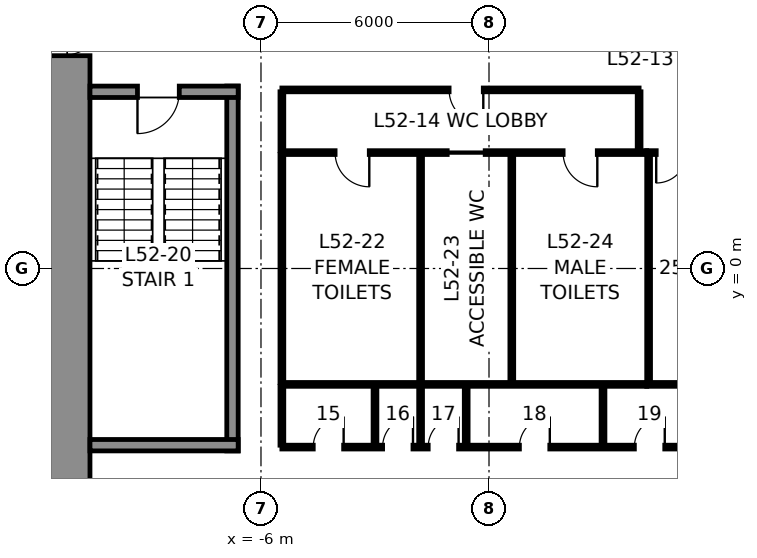
"""IFC4 building model, lengths in metres.
Left out: names, types, materials, properties, quantities, classifications, styles, units other than length and angle.
Written with IfcOpenShell. Run it as: python <this file> out.ifc"""

import sys

from ifc_helpers import new_model, si_unit, direction, frame, frame_2d, origin, place, context, subcontext, project, spatial, rectangle, extrude, element, fill, save


model = new_model("IFC4")
c1 = context("Model", 3, precision=1e-05, world=origin(), true_north=direction((0.0, 1.0)))
c2 = subcontext(c1, "Body", "Model", "MODEL_VIEW")
j1 = project(units=[si_unit("LENGTHUNIT", "METRE"), si_unit("PLANEANGLEUNIT", "RADIAN")], contexts=[c1])
p1 = place(None, origin())
s1 = spatial("IfcSite", under=j1, at=p1, CompositionType="ELEMENT")
p2 = place(p1, origin())
s2 = spatial("IfcBuilding", under=s1, at=p2, CompositionType="ELEMENT")
p3 = place(p2, frame((0.0, 0.0, 237.8)))
s3 = spatial("IfcBuildingStorey", under=s2, at=p3, CompositionType="ELEMENT", Elevation=237.8)
p4 = place(p3, frame((-11.25, -10.5, 0.0), z_axis=(0.0, 0.0, 1.0), x_axis=(0.0, 1.0, 0.0)))
e1 = element("IfcWall", 1, at=p4, inside=s3, PredefinedType="SHEAR", context=c2, shape_type="SweptSolid", body=[
    extrude(rectangle(XDim=21.0, YDim=1.5, at=frame_2d((10.5, 0.0))), origin(), (0.0, 0.0, 1.0), 4.0),
])
p5 = place(p4, frame((16.1, 0.0, 0.0)))
e2 = element("IfcOpeningElement", 2, at=p5, cuts=e1, PredefinedType="OPENING", context=c2, shape_type="SweptSolid", body=[
    extrude(rectangle(XDim=1.2, YDim=2.3, at=frame_2d((0.6, 1.15))), frame((0.0, 0.76, 0.0), z_axis=(0.0, -1.0, 0.0), x_axis=(1.0, 0.0, 0.0)), (0.0, 0.0, 1.0), 1.52),
])
p6 = place(p4, frame((3.7, 0.0, 0.0)))
e3 = element("IfcOpeningElement", 3, at=p6, cuts=e1, PredefinedType="OPENING", context=c2, shape_type="SweptSolid", body=[
    extrude(rectangle(XDim=1.2, YDim=2.3, at=frame_2d((0.6, 1.15))), frame((0.0, 0.76, 0.0), z_axis=(0.0, -1.0, 0.0), x_axis=(1.0, 0.0, 0.0)), (0.0, 0.0, 1.0), 1.52),
])
p7 = place(p3, frame((-6.75, -4.8, 0.0), z_axis=(0.0, 0.0, 1.0), x_axis=(0.0, 1.0, 0.0)))
e4 = element("IfcWall", 4, at=p7, inside=s3, PredefinedType="SOLIDWALL", context=c2, shape_type="SweptSolid", body=[
    extrude(rectangle(XDim=9.6, YDim=0.3, at=frame_2d((4.8, 0.0))), origin(), (0.0, 0.0, 1.0), 3.75),
])
p8 = place(p3, frame((-10.5, 4.65, 0.0), z_axis=(0.0, 0.0, 1.0), x_axis=(1.0, 0.0, 0.0)))
e5 = element("IfcWall", 5, at=p8, inside=s3, PredefinedType="SOLIDWALL", context=c2, shape_type="SweptSolid", body=[
    extrude(rectangle(XDim=3.9, YDim=0.3, at=frame_2d((1.95, 0.0))), origin(), (0.0, 0.0, 1.0), 3.75),
])
p9 = place(p8, frame((1.25, 0.0, 0.0)))
e6 = element("IfcOpeningElement", 6, at=p9, cuts=e5, PredefinedType="OPENING", context=c2, shape_type="SweptSolid", body=[
    extrude(rectangle(XDim=1.1, YDim=2.3, at=frame_2d((0.55, 1.15))), frame((0.0, 0.16, 0.0), z_axis=(0.0, -1.0, 0.0), x_axis=(1.0, 0.0, 0.0)), (0.0, 0.0, 1.0), 0.32),
])
p10 = place(p3, frame((-6.6, -4.65, 0.0), z_axis=(0.0, 0.0, 1.0), x_axis=(-1.0, 0.0, 0.0)))
e7 = element("IfcWall", 7, at=p10, inside=s3, PredefinedType="SOLIDWALL", context=c2, shape_type="SweptSolid", body=[
    extrude(rectangle(XDim=3.9, YDim=0.3, at=frame_2d((1.95, 0.0))), origin(), (0.0, 0.0, 1.0), 3.75),
])
p11 = place(p3, frame((-5.45, 3.05, 0.0), z_axis=(0.0, 0.0, 1.0), x_axis=(1.0, 0.0, 0.0)))
e8 = element("IfcWall", 8, at=p11, inside=s3, PredefinedType="PARTITIONING", context=c2, shape_type="SweptSolid", body=[
    extrude(rectangle(XDim=9.6, YDim=0.1, at=frame_2d((4.8, 0.0))), origin(), (0.0, 0.0, 1.0), 3.75),
])
p12 = place(p11, frame((1.4, 0.0, 0.0)))
e9 = element("IfcOpeningElement", 9, at=p12, cuts=e8, PredefinedType="OPENING", context=c2, shape_type="SweptSolid", body=[
    extrude(rectangle(XDim=0.9, YDim=2.3, at=frame_2d((0.45, 1.15))), frame((0.0, 0.06, 0.0), z_axis=(0.0, -1.0, 0.0), x_axis=(1.0, 0.0, 0.0)), (0.0, 0.0, 1.0), 0.12),
])
p13 = place(p11, frame((4.35, 0.0, 0.0)))
e10 = element("IfcOpeningElement", 10, at=p13, cuts=e8, PredefinedType="OPENING", context=c2, shape_type="SweptSolid", body=[
    extrude(rectangle(XDim=1.0, YDim=2.3, at=frame_2d((0.5, 1.15))), frame((0.0, 0.06, 0.0), z_axis=(0.0, -1.0, 0.0), x_axis=(1.0, 0.0, 0.0)), (0.0, 0.0, 1.0), 0.12),
])
p14 = place(p11, frame((7.4, 0.0, 0.0)))
e11 = element("IfcOpeningElement", 11, at=p14, cuts=e8, PredefinedType="OPENING", context=c2, shape_type="SweptSolid", body=[
    extrude(rectangle(XDim=0.9, YDim=2.3, at=frame_2d((0.45, 1.15))), frame((0.0, 0.06, 0.0), z_axis=(0.0, -1.0, 0.0), x_axis=(1.0, 0.0, 0.0)), (0.0, 0.0, 1.0), 0.12),
])
p15 = place(p3, frame((4.15, 3.05, 0.0), z_axis=(0.0, 0.0, 1.0), x_axis=(1.0, 0.0, 0.0)))
e12 = element("IfcWall", 12, at=p15, inside=s3, PredefinedType="PARTITIONING", context=c2, shape_type="SweptSolid", body=[
    extrude(rectangle(XDim=1.3, YDim=0.1, at=frame_2d((0.65, 0.0))), origin(), (0.0, 0.0, 1.0), 3.75),
])
p16 = place(p15, frame((0.25, 0.0, 0.0)))
e13 = element("IfcOpeningElement", 13, at=p16, cuts=e12, PredefinedType="OPENING", context=c2, shape_type="SweptSolid", body=[
    extrude(rectangle(XDim=0.8, YDim=2.3, at=frame_2d((0.4, 1.15))), frame((0.0, 0.06, 0.0), z_axis=(0.0, -1.0, 0.0), x_axis=(1.0, 0.0, 0.0)), (0.0, 0.0, 1.0), 0.12),
])
p17 = place(p3, frame((4.15, -3.05, 0.0), z_axis=(0.0, 0.0, 1.0), x_axis=(-1.0, 0.0, 0.0)))
e14 = element("IfcWall", 14, at=p17, inside=s3, PredefinedType="PARTITIONING", context=c2, shape_type="SweptSolid", body=[
    extrude(rectangle(XDim=9.6, YDim=0.1, at=frame_2d((4.8, 0.0))), origin(), (0.0, 0.0, 1.0), 3.75),
])
p18 = place(p3, frame((5.45, -3.05, 0.0), z_axis=(0.0, 0.0, 1.0), x_axis=(-1.0, 0.0, 0.0)))
e15 = element("IfcWall", 15, at=p18, inside=s3, PredefinedType="PARTITIONING", context=c2, shape_type="SweptSolid", body=[
    extrude(rectangle(XDim=1.3, YDim=0.1, at=frame_2d((0.65, 0.0))), origin(), (0.0, 0.0, 1.0), 3.75),
])
for number, where, z_axis, x_axis in (
    (16, (-5.45, -3.0, 0.0), (0.0, 0.0, 1.0), (0.0, 1.0, 0.0)),
    (17, (-1.8, -3.0, 0.0), (0.0, 0.0, 1.0), (0.0, 1.0, 0.0)),
    (18, (0.6, -3.0, 0.0), (0.0, 0.0, 1.0), (0.0, 1.0, 0.0)),
    (19, (4.2, -3.0, 0.0), (0.0, 0.0, 1.0), (0.0, 1.0, 0.0)),
):
    element("IfcWall", number, at=place(p3, frame(where, z_axis=z_axis, x_axis=x_axis)), inside=s3, PredefinedType="PARTITIONING", context=c2, shape_type="SweptSolid", body=[
        extrude(rectangle(XDim=6.0, YDim=0.1, at=frame_2d((3.0, 0.0))), origin(), (0.0, 0.0, 1.0), 3.75),
    ])
p19 = place(p3, frame((-5.45, 4.7, 0.0), z_axis=(0.0, 0.0, 1.0), x_axis=(1.0, 0.0, 0.0)))
e20 = element("IfcWall", 20, at=p19, inside=s3, PredefinedType="PARTITIONING", context=c2, shape_type="SweptSolid", body=[
    extrude(rectangle(XDim=9.4, YDim=0.1, at=frame_2d((4.7, 0.0))), origin(), (0.0, 0.0, 1.0), 3.75),
])
p20 = place(p19, frame((4.4, 0.0, 0.0)))
e21 = element("IfcOpeningElement", 21, at=p20, cuts=e20, PredefinedType="OPENING", context=c2, shape_type="SweptSolid", body=[
    extrude(rectangle(XDim=0.9, YDim=2.3, at=frame_2d((0.45, 1.15))), frame((0.0, 0.06, 0.0), z_axis=(0.0, -1.0, 0.0), x_axis=(1.0, 0.0, 0.0)), (0.0, 0.0, 1.0), 0.12),
])
for number, where, z_axis, x_axis in (
    (22, (-5.45, 3.1, 0.0), (0.0, 0.0, 1.0), (0.0, 1.0, 0.0)),
    (23, (3.95, 3.1, 0.0), (0.0, 0.0, 1.0), (0.0, 1.0, 0.0)),
):
    element("IfcWall", number, at=place(p3, frame(where, z_axis=z_axis, x_axis=x_axis)), inside=s3, PredefinedType="PARTITIONING", context=c2, shape_type="SweptSolid", body=[
        extrude(rectangle(XDim=1.55, YDim=0.1, at=frame_2d((0.775, 0.0))), origin(), (0.0, 0.0, 1.0), 3.75),
    ])
p21 = place(p3, frame((5.45, -4.7, 0.0), z_axis=(0.0, 0.0, 1.0), x_axis=(-1.0, 0.0, 0.0)))
e24 = element("IfcWall", 24, at=p21, inside=s3, PredefinedType="PARTITIONING", context=c2, shape_type="SweptSolid", body=[
    extrude(rectangle(XDim=10.9, YDim=0.1, at=frame_2d((5.45, 0.0))), origin(), (0.0, 0.0, 1.0), 3.75),
])
p22 = place(p21, frame((9.275, 0.0, 0.0)))
e25 = element("IfcOpeningElement", 25, at=p22, cuts=e24, PredefinedType="OPENING", context=c2, shape_type="SweptSolid", body=[
    extrude(rectangle(XDim=0.8, YDim=2.3, at=frame_2d((0.4, 1.15))), frame((0.0, 0.06, 0.0), z_axis=(0.0, -1.0, 0.0), x_axis=(1.0, 0.0, 0.0)), (0.0, 0.0, 1.0), 0.12),
])
p23 = place(p21, frame((7.45, 0.0, 0.0)))
e26 = element("IfcOpeningElement", 26, at=p23, cuts=e24, PredefinedType="OPENING", context=c2, shape_type="SweptSolid", body=[
    extrude(rectangle(XDim=0.8, YDim=2.3, at=frame_2d((0.4, 1.15))), frame((0.0, 0.06, 0.0), z_axis=(0.0, -1.0, 0.0), x_axis=(1.0, 0.0, 0.0)), (0.0, 0.0, 1.0), 0.12),
])
p24 = place(p21, frame((6.25, 0.0, 0.0)))
e27 = element("IfcOpeningElement", 27, at=p24, cuts=e24, PredefinedType="OPENING", context=c2, shape_type="SweptSolid", body=[
    extrude(rectangle(XDim=0.8, YDim=2.3, at=frame_2d((0.4, 1.15))), frame((0.0, 0.06, 0.0), z_axis=(0.0, -1.0, 0.0), x_axis=(1.0, 0.0, 0.0)), (0.0, 0.0, 1.0), 0.12),
])
p25 = place(p21, frame((3.85, 0.0, 0.0)))
e28 = element("IfcOpeningElement", 28, at=p25, cuts=e24, PredefinedType="OPENING", context=c2, shape_type="SweptSolid", body=[
    extrude(rectangle(XDim=0.8, YDim=2.3, at=frame_2d((0.4, 1.15))), frame((0.0, 0.06, 0.0), z_axis=(0.0, -1.0, 0.0), x_axis=(1.0, 0.0, 0.0)), (0.0, 0.0, 1.0), 0.12),
])
p26 = place(p21, frame((0.825, 0.0, 0.0)))
e29 = element("IfcOpeningElement", 29, at=p26, cuts=e24, PredefinedType="OPENING", context=c2, shape_type="SweptSolid", body=[
    extrude(rectangle(XDim=0.8, YDim=2.3, at=frame_2d((0.4, 1.15))), frame((0.0, 0.06, 0.0), z_axis=(0.0, -1.0, 0.0), x_axis=(1.0, 0.0, 0.0)), (0.0, 0.0, 1.0), 0.12),
])
for number, where, z_axis, x_axis in (
    (30, (-5.45, -3.1, 0.0), (0.0, 0.0, 1.0), (0.0, -1.0, 0.0)),
    (31, (-3.0, -3.1, 0.0), (0.0, 0.0, 1.0), (0.0, -1.0, 0.0)),
    (32, (-1.8, -3.1, 0.0), (0.0, 0.0, 1.0), (0.0, -1.0, 0.0)),
    (33, (-0.6, -3.1, 0.0), (0.0, 0.0, 1.0), (0.0, -1.0, 0.0)),
    (34, (3.0, -3.1, 0.0), (0.0, 0.0, 1.0), (0.0, -1.0, 0.0)),
):
    element("IfcWall", number, at=place(p3, frame(where, z_axis=z_axis, x_axis=x_axis)), inside=s3, PredefinedType="PARTITIONING", context=c2, shape_type="SweptSolid", body=[
        extrude(rectangle(XDim=1.55, YDim=0.1, at=frame_2d((0.775, 0.0))), origin(), (0.0, 0.0, 1.0), 3.75),
    ])
p27 = place(p9, frame((1.1, 0.0, 0.0), z_axis=(0.0, 0.0, 1.0), x_axis=(-1.0, 0.0, 0.0)))
e35 = element("IfcDoor", 35, at=p27, inside=s3, OperationType="SINGLE_SWING_RIGHT", PredefinedType="DOOR", context=c2, shape_type="SweptSolid", body=[
    extrude(rectangle(XDim=1.1, YDim=2.3, at=frame_2d((0.55, 1.15))), frame((0.0, 0.025, 0.0), z_axis=(0.0, -1.0, 0.0), x_axis=(1.0, 0.0, 0.0)), (0.0, 0.0, 1.0), 0.05),
])
fill(e6, e35)
p28 = place(p12, frame((0.9, 0.0, 0.0), z_axis=(0.0, 0.0, 1.0), x_axis=(-1.0, 0.0, 0.0)))
e36 = element("IfcDoor", 36, at=p28, inside=s3, OperationType="SINGLE_SWING_LEFT", PredefinedType="DOOR", context=c2, shape_type="SweptSolid", body=[
    extrude(rectangle(XDim=0.9, YDim=2.3, at=frame_2d((0.45, 1.15))), frame((0.0, 0.025, 0.0), z_axis=(0.0, -1.0, 0.0), x_axis=(1.0, 0.0, 0.0)), (0.0, 0.0, 1.0), 0.05),
])
fill(e9, e36)
p29 = place(p13, frame((1.0, 0.0, 0.0), z_axis=(0.0, 0.0, 1.0), x_axis=(-1.0, 0.0, 0.0)))
e37 = element("IfcDoor", 37, at=p29, inside=s3, OperationType="SLIDING_TO_LEFT", PredefinedType="DOOR", context=c2, shape_type="SweptSolid", body=[
    extrude(rectangle(XDim=1.0, YDim=2.3, at=frame_2d((0.5, 1.15))), frame((0.0, 0.025, 0.0), z_axis=(0.0, -1.0, 0.0), x_axis=(1.0, 0.0, 0.0)), (0.0, 0.0, 1.0), 0.05),
])
fill(e10, e37)
p30 = place(p14, frame((0.9, 0.0, 0.0), z_axis=(0.0, 0.0, 1.0), x_axis=(-1.0, 0.0, 0.0)))
e38 = element("IfcDoor", 38, at=p30, inside=s3, OperationType="SINGLE_SWING_LEFT", PredefinedType="DOOR", context=c2, shape_type="SweptSolid", body=[
    extrude(rectangle(XDim=0.9, YDim=2.3, at=frame_2d((0.45, 1.15))), frame((0.0, 0.025, 0.0), z_axis=(0.0, -1.0, 0.0), x_axis=(1.0, 0.0, 0.0)), (0.0, 0.0, 1.0), 0.05),
])
fill(e11, e38)
p31 = place(p16, frame((0.8, 0.0, 0.0), z_axis=(0.0, 0.0, 1.0), x_axis=(-1.0, 0.0, 0.0)))
e39 = element("IfcDoor", 39, at=p31, inside=s3, OperationType="SINGLE_SWING_RIGHT", PredefinedType="DOOR", context=c2, shape_type="SweptSolid", body=[
    extrude(rectangle(XDim=0.8, YDim=2.3, at=frame_2d((0.4, 1.15))), frame((0.0, 0.025, 0.0), z_axis=(0.0, -1.0, 0.0), x_axis=(1.0, 0.0, 0.0)), (0.0, 0.0, 1.0), 0.05),
])
fill(e13, e39)
p32 = place(p20, frame((0.9, 0.0, 0.0), z_axis=(0.0, 0.0, 1.0), x_axis=(-1.0, 0.0, 0.0)))
e40 = element("IfcDoor", 40, at=p32, inside=s3, OperationType="SINGLE_SWING_LEFT", PredefinedType="DOOR", context=c2, shape_type="SweptSolid", body=[
    extrude(rectangle(XDim=0.9, YDim=2.3, at=frame_2d((0.45, 1.15))), frame((0.0, 0.025, 0.0), z_axis=(0.0, -1.0, 0.0), x_axis=(1.0, 0.0, 0.0)), (0.0, 0.0, 1.0), 0.05),
])
fill(e21, e40)
p33 = place(p22, frame((0.8, 0.0, 0.0), z_axis=(0.0, 0.0, 1.0), x_axis=(-1.0, 0.0, 0.0)))
e41 = element("IfcDoor", 41, at=p33, inside=s3, OperationType="SINGLE_SWING_RIGHT", PredefinedType="DOOR", context=c2, shape_type="SweptSolid", body=[
    extrude(rectangle(XDim=0.8, YDim=2.3, at=frame_2d((0.4, 1.15))), frame((0.0, 0.025, 0.0), z_axis=(0.0, -1.0, 0.0), x_axis=(1.0, 0.0, 0.0)), (0.0, 0.0, 1.0), 0.05),
])
fill(e25, e41)
p34 = place(p23, frame((0.8, 0.0, 0.0), z_axis=(0.0, 0.0, 1.0), x_axis=(-1.0, 0.0, 0.0)))
e42 = element("IfcDoor", 42, at=p34, inside=s3, OperationType="SINGLE_SWING_RIGHT", PredefinedType="DOOR", context=c2, shape_type="SweptSolid", body=[
    extrude(rectangle(XDim=0.8, YDim=2.3, at=frame_2d((0.4, 1.15))), frame((0.0, 0.025, 0.0), z_axis=(0.0, -1.0, 0.0), x_axis=(1.0, 0.0, 0.0)), (0.0, 0.0, 1.0), 0.05),
])
fill(e26, e42)
p35 = place(p24, frame((0.8, 0.0, 0.0), z_axis=(0.0, 0.0, 1.0), x_axis=(-1.0, 0.0, 0.0)))
e43 = element("IfcDoor", 43, at=p35, inside=s3, OperationType="SINGLE_SWING_RIGHT", PredefinedType="DOOR", context=c2, shape_type="SweptSolid", body=[
    extrude(rectangle(XDim=0.8, YDim=2.3, at=frame_2d((0.4, 1.15))), frame((0.0, 0.025, 0.0), z_axis=(0.0, -1.0, 0.0), x_axis=(1.0, 0.0, 0.0)), (0.0, 0.0, 1.0), 0.05),
])
fill(e27, e43)
p36 = place(p25, frame((0.8, 0.0, 0.0), z_axis=(0.0, 0.0, 1.0), x_axis=(-1.0, 0.0, 0.0)))
e44 = element("IfcDoor", 44, at=p36, inside=s3, OperationType="SINGLE_SWING_RIGHT", PredefinedType="DOOR", context=c2, shape_type="SweptSolid", body=[
    extrude(rectangle(XDim=0.8, YDim=2.3, at=frame_2d((0.4, 1.15))), frame((0.0, 0.025, 0.0), z_axis=(0.0, -1.0, 0.0), x_axis=(1.0, 0.0, 0.0)), (0.0, 0.0, 1.0), 0.05),
])
fill(e28, e44)
p37 = place(p26, frame((0.8, 0.0, 0.0), z_axis=(0.0, 0.0, 1.0), x_axis=(-1.0, 0.0, 0.0)))
e45 = element("IfcDoor", 45, at=p37, inside=s3, OperationType="SINGLE_SWING_RIGHT", PredefinedType="DOOR", context=c2, shape_type="SweptSolid", body=[
    extrude(rectangle(XDim=0.8, YDim=2.3, at=frame_2d((0.4, 1.15))), frame((0.0, 0.025, 0.0), z_axis=(0.0, -1.0, 0.0), x_axis=(1.0, 0.0, 0.0)), (0.0, 0.0, 1.0), 0.05),
])
fill(e29, e45)
p38 = place(p5, frame((1.2, 0.0, 0.0), z_axis=(0.0, 0.0, 1.0), x_axis=(-1.0, 0.0, 0.0)))
e46 = element("IfcDoor", 46, at=p38, inside=s3, OperationType="SINGLE_SWING_LEFT", PredefinedType="DOOR", context=c2, shape_type="SweptSolid", body=[
    extrude(rectangle(XDim=1.2, YDim=2.3, at=frame_2d((0.6, 1.15))), frame((0.0, 0.025, 0.0), z_axis=(0.0, -1.0, 0.0), x_axis=(1.0, 0.0, 0.0)), (0.0, 0.0, 1.0), 0.05),
])
fill(e2, e46)
save(model, sys.argv[1])
